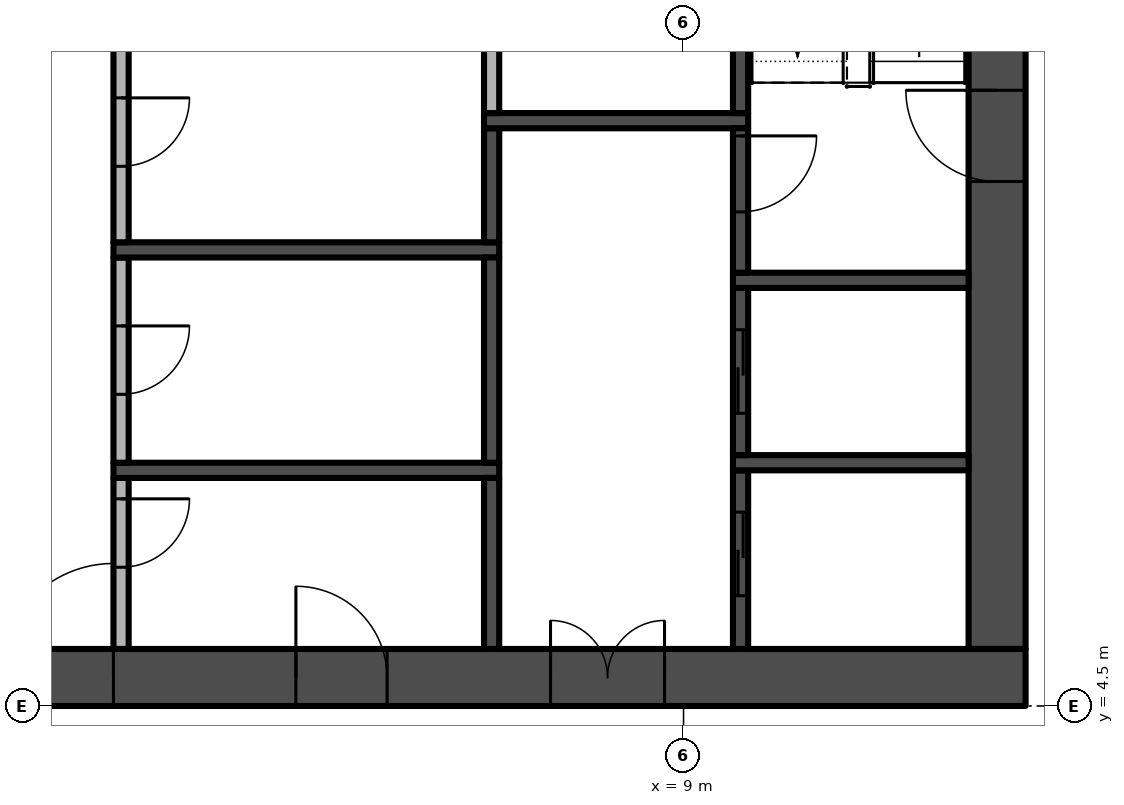
"""IFC4 building model, lengths in metres.
Left out: names, types, materials, properties, quantities, classifications, styles, units other than length and angle.
Written with IfcOpenShell. Run it as: python <this file> out.ifc"""

import sys

from ifc_helpers import new_model, si_unit, direction, frame, frame_2d, origin, place, context, subcontext, project, spatial, rectangle, extrude, element, fill, save


model = new_model("IFC4")
c1 = context("Model", 3, precision=1e-05, world=origin(), true_north=direction((0.0, 1.0)))
c2 = subcontext(c1, "Body", "Model", "MODEL_VIEW")
j1 = project(units=[si_unit("LENGTHUNIT", "METRE"), si_unit("PLANEANGLEUNIT", "RADIAN")], contexts=[c1])
p1 = place(None, origin())
s1 = spatial("IfcSite", under=j1, at=p1, CompositionType="ELEMENT")
p2 = place(p1, origin())
s2 = spatial("IfcBuilding", under=s1, at=p2, CompositionType="ELEMENT")
p3 = place(p2, frame((0.0, 0.0, 170.6)))
s3 = spatial("IfcBuildingStorey", under=s2, at=p3, CompositionType="ELEMENT", Elevation=170.6)
p4 = place(p3, frame((-13.5, 4.875, -0.3), z_axis=(0.0, 0.0, 1.0), x_axis=(1.0, 0.0, 0.0)))
e1 = element("IfcWall", 1, at=p4, inside=s3, PredefinedType="SHEAR", context=c2, shape_type="SweptSolid", body=[
    extrude(rectangle(XDim=27.0, YDim=0.75, at=frame_2d((13.5, 0.0))), origin(), (0.0, 0.0, 1.0), 3.8),
])
p5 = place(p4, frame((12.0, 0.0, 0.3)))
e2 = element("IfcOpeningElement", 2, at=p5, cuts=e1, PredefinedType="OPENING", context=c2, shape_type="SweptSolid", body=[
    extrude(rectangle(XDim=3.0, YDim=2.4, at=frame_2d((1.5, 1.2))), frame((0.0, 0.385, 0.0), z_axis=(0.0, -1.0, 0.0), x_axis=(1.0, 0.0, 0.0)), (0.0, 0.0, 1.0), 0.77),
])
p6 = place(p4, frame((4.9, 0.0, 0.3)))
e3 = element("IfcOpeningElement", 3, at=p6, cuts=e1, PredefinedType="OPENING", context=c2, shape_type="SweptSolid", body=[
    extrude(rectangle(XDim=1.2, YDim=2.2, at=frame_2d((0.6, 1.1))), frame((0.0, 0.385, 0.0), z_axis=(0.0, -1.0, 0.0), x_axis=(1.0, 0.0, 0.0)), (0.0, 0.0, 1.0), 0.77),
])
p7 = place(p4, frame((20.75, 0.0, 0.3)))
e4 = element("IfcOpeningElement", 4, at=p7, cuts=e1, PredefinedType="OPENING", context=c2, shape_type="SweptSolid", body=[
    extrude(rectangle(XDim=1.5, YDim=2.2, at=frame_2d((0.75, 1.1))), frame((0.0, 0.385, 0.0), z_axis=(0.0, -1.0, 0.0), x_axis=(1.0, 0.0, 0.0)), (0.0, 0.0, 1.0), 0.77),
])
p8 = place(p4, frame((17.4, 0.0, 0.3)))
e5 = element("IfcOpeningElement", 5, at=p8, cuts=e1, PredefinedType="OPENING", context=c2, shape_type="SweptSolid", body=[
    extrude(rectangle(XDim=1.2, YDim=2.2, at=frame_2d((0.6, 1.1))), frame((0.0, 0.385, 0.0), z_axis=(0.0, -1.0, 0.0), x_axis=(1.0, 0.0, 0.0)), (0.0, 0.0, 1.0), 0.77),
])
p9 = place(p3, frame((13.125, 5.25, -0.3), z_axis=(0.0, 0.0, 1.0), x_axis=(0.0, 1.0, 0.0)))
e6 = element("IfcWall", 6, at=p9, inside=s3, PredefinedType="SHEAR", context=c2, shape_type="SweptSolid", body=[
    extrude(rectangle(XDim=16.5, YDim=0.75, at=frame_2d((8.25, 0.0))), origin(), (0.0, 0.0, 1.0), 3.8),
])
p10 = place(p9, frame((6.15, 0.0, 0.3)))
e7 = element("IfcOpeningElement", 7, at=p10, cuts=e6, PredefinedType="OPENING", context=c2, shape_type="SweptSolid", body=[
    extrude(rectangle(XDim=1.2, YDim=2.2, at=frame_2d((0.6, 1.1))), frame((0.0, 0.385, 0.0), z_axis=(0.0, -1.0, 0.0), x_axis=(1.0, 0.0, 0.0)), (0.0, 0.0, 1.0), 0.77),
])
p11 = place(p3, frame((1.6, 7.5, 0.0), z_axis=(0.0, 0.0, 1.0), x_axis=(0.0, -1.0, 0.0)))
e8 = element("IfcWall", 8, at=p11, inside=s3, PredefinedType="PARTITIONING", context=c2, shape_type="SweptSolid", body=[
    extrude(rectangle(XDim=2.25, YDim=0.2, at=frame_2d((1.125, 0.0))), origin(), (0.0, 0.0, 1.0), 3.5),
])
p12 = place(p11, frame((0.275, 0.0, 0.0)))
e9 = element("IfcOpeningElement", 9, at=p12, cuts=e8, PredefinedType="OPENING", context=c2, shape_type="SweptSolid", body=[
    extrude(rectangle(XDim=0.9, YDim=2.1, at=frame_2d((0.45, 1.05))), frame((0.0, 0.11, 0.0), z_axis=(0.0, -1.0, 0.0), x_axis=(1.0, 0.0, 0.0)), (0.0, 0.0, 1.0), 0.22),
])
p13 = place(p3, frame((1.5, 7.6, 0.0), z_axis=(0.0, 0.0, 1.0), x_axis=(1.0, 0.0, 0.0)))
e10 = element("IfcWall", 10, at=p13, inside=s3, PredefinedType="SHEAR", context=c2, shape_type="SweptSolid", body=[
    extrude(rectangle(XDim=5.075, YDim=0.2, at=frame_2d((2.538, 0.0))), origin(), (0.0, 0.0, 1.0), 3.5),
])
p14 = place(p3, frame((1.6, 10.4, 0.0), z_axis=(0.0, 0.0, 1.0), x_axis=(0.0, -1.0, 0.0)))
e11 = element("IfcWall", 11, at=p14, inside=s3, PredefinedType="PARTITIONING", context=c2, shape_type="SweptSolid", body=[
    extrude(rectangle(XDim=2.7, YDim=0.2, at=frame_2d((1.35, 0.0))), origin(), (0.0, 0.0, 1.0), 3.5),
])
p15 = place(p14, frame((0.9, 0.0, 0.0)))
e12 = element("IfcOpeningElement", 12, at=p15, cuts=e11, PredefinedType="OPENING", context=c2, shape_type="SweptSolid", body=[
    extrude(rectangle(XDim=0.9, YDim=2.1, at=frame_2d((0.45, 1.05))), frame((0.0, 0.11, 0.0), z_axis=(0.0, -1.0, 0.0), x_axis=(1.0, 0.0, 0.0)), (0.0, 0.0, 1.0), 0.22),
])
p16 = place(p3, frame((1.5, 10.5, 0.0), z_axis=(0.0, 0.0, 1.0), x_axis=(1.0, 0.0, 0.0)))
e13 = element("IfcWall", 13, at=p16, inside=s3, PredefinedType="SHEAR", context=c2, shape_type="SweptSolid", body=[
    extrude(rectangle(XDim=5.075, YDim=0.2, at=frame_2d((2.538, 0.0))), origin(), (0.0, 0.0, 1.0), 3.5),
])
p17 = place(p3, frame((1.6, 13.5, 0.0), z_axis=(0.0, 0.0, 1.0), x_axis=(0.0, -1.0, 0.0)))
e14 = element("IfcWall", 14, at=p17, inside=s3, PredefinedType="PARTITIONING", context=c2, shape_type="SweptSolid", body=[
    extrude(rectangle(XDim=2.9, YDim=0.2, at=frame_2d((1.45, 0.0))), origin(), (0.0, 0.0, 1.0), 3.5),
])
p18 = place(p17, frame((1.0, 0.0, 0.0)))
e15 = element("IfcOpeningElement", 15, at=p18, cuts=e14, PredefinedType="OPENING", context=c2, shape_type="SweptSolid", body=[
    extrude(rectangle(XDim=0.9, YDim=2.1, at=frame_2d((0.45, 1.05))), frame((0.0, 0.11, 0.0), z_axis=(0.0, -1.0, 0.0), x_axis=(1.0, 0.0, 0.0)), (0.0, 0.0, 1.0), 0.22),
])
p19 = place(p3, frame((6.475, 5.25, 0.0), z_axis=(0.0, 0.0, 1.0), x_axis=(0.0, 1.0, 0.0)))
e16 = element("IfcWall", 16, at=p19, inside=s3, PredefinedType="SHEAR", context=c2, shape_type="SweptSolid", body=[
    extrude(rectangle(XDim=2.25, YDim=0.2, at=frame_2d((1.125, 0.0))), origin(), (0.0, 0.0, 1.0), 3.5),
])
p20 = place(p3, frame((6.475, 7.7, 0.0), z_axis=(0.0, 0.0, 1.0), x_axis=(0.0, 1.0, 0.0)))
e17 = element("IfcWall", 17, at=p20, inside=s3, PredefinedType="SHEAR", context=c2, shape_type="SweptSolid", body=[
    extrude(rectangle(XDim=2.7, YDim=0.2, at=frame_2d((1.35, 0.0))), origin(), (0.0, 0.0, 1.0), 3.5),
])
p21 = place(p3, frame((6.475, 10.6, 0.0), z_axis=(0.0, 0.0, 1.0), x_axis=(0.0, 1.0, 0.0)))
e18 = element("IfcWall", 18, at=p21, inside=s3, PredefinedType="SHEAR", context=c2, shape_type="SweptSolid", body=[
    extrude(rectangle(XDim=1.5, YDim=0.2, at=frame_2d((0.75, 0.0))), origin(), (0.0, 0.0, 1.0), 3.5),
])
p22 = place(p3, frame((6.375, 12.2, 0.0), z_axis=(0.0, 0.0, 1.0), x_axis=(1.0, 0.0, 0.0)))
e19 = element("IfcWall", 19, at=p22, inside=s3, PredefinedType="SHEAR", context=c2, shape_type="SweptSolid", body=[
    extrude(rectangle(XDim=3.475, YDim=0.2, at=frame_2d((1.738, 0.0))), origin(), (0.0, 0.0, 1.0), 3.5),
])
p23 = place(p3, frame((6.475, 12.3, 0.0), z_axis=(0.0, 0.0, 1.0), x_axis=(0.0, 1.0, 0.0)))
e20 = element("IfcWall", 20, at=p23, inside=s3, PredefinedType="PARTITIONING", context=c2, shape_type="SweptSolid", body=[
    extrude(rectangle(XDim=1.2, YDim=0.2, at=frame_2d((0.6, 0.0))), origin(), (0.0, 0.0, 1.0), 3.5),
])
p24 = place(p3, frame((9.75, 5.25, 0.0), z_axis=(0.0, 0.0, 1.0), x_axis=(0.0, 1.0, 0.0)))
e21 = element("IfcWall", 21, at=p24, inside=s3, PredefinedType="SHEAR", context=c2, shape_type="SweptSolid", body=[
    extrude(rectangle(XDim=2.35, YDim=0.2, at=frame_2d((1.175, 0.0))), origin(), (0.0, 0.0, 1.0), 3.5),
])
p25 = place(p24, frame((0.7, 0.0, 0.0)))
e22 = element("IfcOpeningElement", 22, at=p25, cuts=e21, PredefinedType="OPENING", context=c2, shape_type="SweptSolid", body=[
    extrude(rectangle(XDim=1.1, YDim=2.1, at=frame_2d((0.55, 1.05))), frame((0.0, 0.11, 0.0), z_axis=(0.0, -1.0, 0.0), x_axis=(1.0, 0.0, 0.0)), (0.0, 0.0, 1.0), 0.22),
])
p26 = place(p3, frame((9.65, 7.7, 0.0), z_axis=(0.0, 0.0, 1.0), x_axis=(1.0, 0.0, 0.0)))
e23 = element("IfcWall", 23, at=p26, inside=s3, PredefinedType="SHEAR", context=c2, shape_type="SweptSolid", body=[
    extrude(rectangle(XDim=3.1, YDim=0.2, at=frame_2d((1.55, 0.0))), origin(), (0.0, 0.0, 1.0), 3.5),
])
p27 = place(p3, frame((9.75, 7.8, 0.0), z_axis=(0.0, 0.0, 1.0), x_axis=(0.0, 1.0, 0.0)))
e24 = element("IfcWall", 24, at=p27, inside=s3, PredefinedType="SHEAR", context=c2, shape_type="SweptSolid", body=[
    extrude(rectangle(XDim=2.2, YDim=0.2, at=frame_2d((1.1, 0.0))), origin(), (0.0, 0.0, 1.0), 3.5),
])
p28 = place(p27, frame((0.55, 0.0, 0.0)))
e25 = element("IfcOpeningElement", 25, at=p28, cuts=e24, PredefinedType="OPENING", context=c2, shape_type="SweptSolid", body=[
    extrude(rectangle(XDim=1.1, YDim=2.1, at=frame_2d((0.55, 1.05))), frame((0.0, 0.11, 0.0), z_axis=(0.0, -1.0, 0.0), x_axis=(1.0, 0.0, 0.0)), (0.0, 0.0, 1.0), 0.22),
])
p29 = place(p3, frame((9.65, 10.1, 0.0), z_axis=(0.0, 0.0, 1.0), x_axis=(1.0, 0.0, 0.0)))
e26 = element("IfcWall", 26, at=p29, inside=s3, PredefinedType="SHEAR", context=c2, shape_type="SweptSolid", body=[
    extrude(rectangle(XDim=3.1, YDim=0.2, at=frame_2d((1.55, 0.0))), origin(), (0.0, 0.0, 1.0), 3.5),
])
p30 = place(p3, frame((9.75, 12.1, 0.0), z_axis=(0.0, 0.0, 1.0), x_axis=(0.0, -1.0, 0.0)))
e27 = element("IfcWall", 27, at=p30, inside=s3, PredefinedType="SHEAR", context=c2, shape_type="SweptSolid", body=[
    extrude(rectangle(XDim=1.9, YDim=0.2, at=frame_2d((0.95, 0.0))), origin(), (0.0, 0.0, 1.0), 3.5),
])
p31 = place(p30, frame((0.1, 0.0, 0.0)))
e28 = element("IfcOpeningElement", 28, at=p31, cuts=e27, PredefinedType="OPENING", context=c2, shape_type="SweptSolid", body=[
    extrude(rectangle(XDim=1.0, YDim=2.2, at=frame_2d((0.5, 1.1))), frame((0.0, 0.11, 0.0), z_axis=(0.0, -1.0, 0.0), x_axis=(1.0, 0.0, 0.0)), (0.0, 0.0, 1.0), 0.22),
])
p32 = place(p3, frame((9.75, 12.3, 0.0), z_axis=(0.0, 0.0, 1.0), x_axis=(0.0, 1.0, 0.0)))
e29 = element("IfcWall", 29, at=p32, inside=s3, PredefinedType="SHEAR", context=c2, shape_type="SweptSolid", body=[
    extrude(rectangle(XDim=3.6, YDim=0.2, at=frame_2d((1.8, 0.0))), origin(), (0.0, 0.0, 1.0), 3.5),
])
p33 = place(p5, frame((3.0, 0.0, 0.0), z_axis=(0.0, 0.0, 1.0), x_axis=(-1.0, 0.0, 0.0)))
e30 = element("IfcDoor", 30, at=p33, inside=s3, OperationType="DOUBLE_DOOR_SINGLE_SWING", PredefinedType="DOOR", context=c2, shape_type="SweptSolid", body=[
    extrude(rectangle(XDim=3.0, YDim=2.4, at=frame_2d((1.5, 1.2))), frame((0.0, 0.025, 0.0), z_axis=(0.0, -1.0, 0.0), x_axis=(1.0, 0.0, 0.0)), (0.0, 0.0, 1.0), 0.05),
])
fill(e2, e30)
p34 = place(p10, frame((1.2, 0.0, 0.0), z_axis=(0.0, 0.0, 1.0), x_axis=(-1.0, 0.0, 0.0)))
e31 = element("IfcDoor", 31, at=p34, inside=s3, OperationType="SINGLE_SWING_LEFT", PredefinedType="DOOR", context=c2, shape_type="SweptSolid", body=[
    extrude(rectangle(XDim=1.2, YDim=2.2, at=frame_2d((0.6, 1.1))), frame((0.0, 0.025, 0.0), z_axis=(0.0, -1.0, 0.0), x_axis=(1.0, 0.0, 0.0)), (0.0, 0.0, 1.0), 0.05),
])
fill(e7, e31)
p35 = place(p7, frame((1.5, 0.0, 0.0), z_axis=(0.0, 0.0, 1.0), x_axis=(-1.0, 0.0, 0.0)))
e32 = element("IfcDoor", 32, at=p35, inside=s3, OperationType="DOUBLE_DOOR_SINGLE_SWING", PredefinedType="DOOR", context=c2, shape_type="SweptSolid", body=[
    extrude(rectangle(XDim=1.5, YDim=2.2, at=frame_2d((0.75, 1.1))), frame((0.0, 0.025, 0.0), z_axis=(0.0, -1.0, 0.0), x_axis=(1.0, 0.0, 0.0)), (0.0, 0.0, 1.0), 0.05),
])
fill(e4, e32)
p36 = place(p8, frame((1.2, 0.0, 0.0), z_axis=(0.0, 0.0, 1.0), x_axis=(-1.0, 0.0, 0.0)))
e33 = element("IfcDoor", 33, at=p36, inside=s3, OperationType="SINGLE_SWING_RIGHT", PredefinedType="DOOR", context=c2, shape_type="SweptSolid", body=[
    extrude(rectangle(XDim=1.2, YDim=2.2, at=frame_2d((0.6, 1.1))), frame((0.0, 0.025, 0.0), z_axis=(0.0, -1.0, 0.0), x_axis=(1.0, 0.0, 0.0)), (0.0, 0.0, 1.0), 0.05),
])
fill(e5, e33)
p37 = place(p31, origin())
e34 = element("IfcDoor", 34, at=p37, inside=s3, OperationType="SINGLE_SWING_LEFT", PredefinedType="DOOR", context=c2, shape_type="SweptSolid", body=[
    extrude(rectangle(XDim=1.0, YDim=2.2, at=frame_2d((0.5, 1.1))), frame((0.0, 0.025, 0.0), z_axis=(0.0, -1.0, 0.0), x_axis=(1.0, 0.0, 0.0)), (0.0, 0.0, 1.0), 0.05),
])
fill(e28, e34)
p38 = place(p25, origin())
e35 = element("IfcDoor", 35, at=p38, inside=s3, OperationType="SLIDING_TO_RIGHT", PredefinedType="DOOR", context=c2, shape_type="SweptSolid", body=[
    extrude(rectangle(XDim=1.1, YDim=2.1, at=frame_2d((0.55, 1.05))), frame((0.0, 0.025, 0.0), z_axis=(0.0, -1.0, 0.0), x_axis=(1.0, 0.0, 0.0)), (0.0, 0.0, 1.0), 0.05),
])
fill(e22, e35)
p39 = place(p28, origin())
e36 = element("IfcDoor", 36, at=p39, inside=s3, OperationType="SLIDING_TO_RIGHT", PredefinedType="DOOR", context=c2, shape_type="SweptSolid", body=[
    extrude(rectangle(XDim=1.1, YDim=2.1, at=frame_2d((0.55, 1.05))), frame((0.0, 0.025, 0.0), z_axis=(0.0, -1.0, 0.0), x_axis=(1.0, 0.0, 0.0)), (0.0, 0.0, 1.0), 0.05),
])
fill(e25, e36)
p40 = place(p12, origin())
e37 = element("IfcDoor", 37, at=p40, inside=s3, OperationType="SINGLE_SWING_LEFT", PredefinedType="DOOR", context=c2, shape_type="SweptSolid", body=[
    extrude(rectangle(XDim=0.9, YDim=2.1, at=frame_2d((0.45, 1.05))), frame((0.0, 0.025, 0.0), z_axis=(0.0, -1.0, 0.0), x_axis=(1.0, 0.0, 0.0)), (0.0, 0.0, 1.0), 0.05),
])
fill(e9, e37)
p41 = place(p15, origin())
e38 = element("IfcDoor", 38, at=p41, inside=s3, OperationType="SINGLE_SWING_LEFT", PredefinedType="DOOR", context=c2, shape_type="SweptSolid", body=[
    extrude(rectangle(XDim=0.9, YDim=2.1, at=frame_2d((0.45, 1.05))), frame((0.0, 0.025, 0.0), z_axis=(0.0, -1.0, 0.0), x_axis=(1.0, 0.0, 0.0)), (0.0, 0.0, 1.0), 0.05),
])
fill(e12, e38)
p42 = place(p18, origin())
e39 = element("IfcDoor", 39, at=p42, inside=s3, OperationType="SINGLE_SWING_LEFT", PredefinedType="DOOR", context=c2, shape_type="SweptSolid", body=[
    extrude(rectangle(XDim=0.9, YDim=2.1, at=frame_2d((0.45, 1.05))), frame((0.0, 0.025, 0.0), z_axis=(0.0, -1.0, 0.0), x_axis=(1.0, 0.0, 0.0)), (0.0, 0.0, 1.0), 0.05),
])
fill(e15, e39)
save(model, sys.argv[1])
